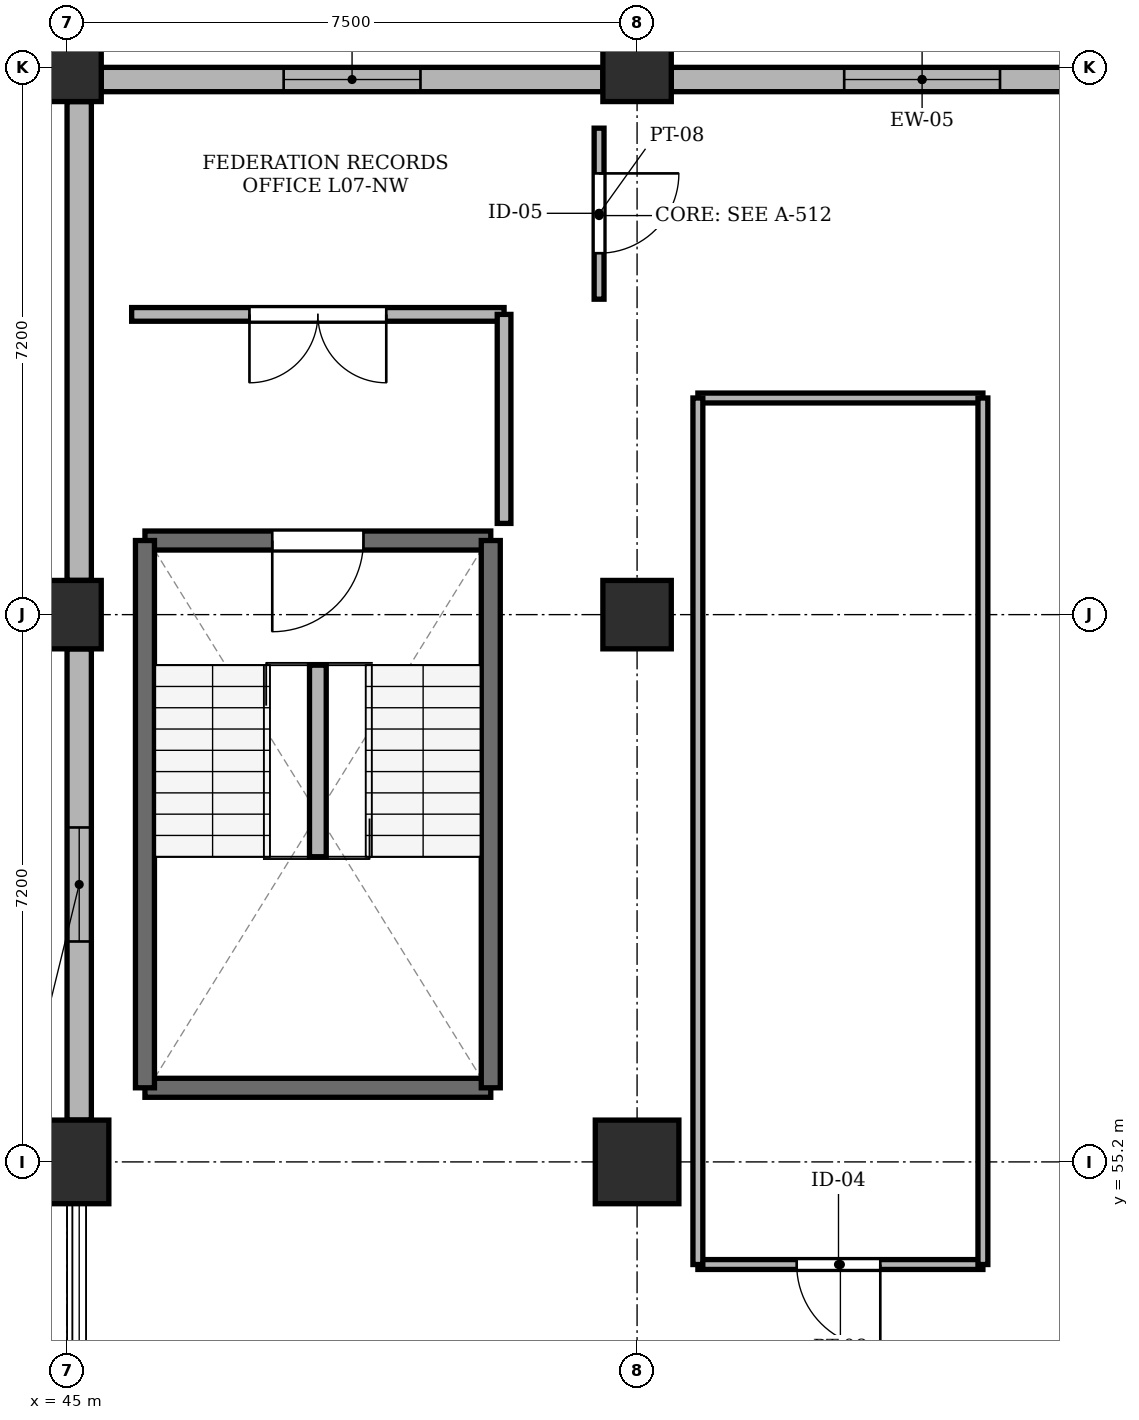
"""IFC4 building model, lengths in metres.
Left out: names, types, materials, properties, quantities, classifications, styles, units other than length and angle.
Written with IfcOpenShell. Run it as: python <this file> out.ifc"""

import sys

from ifc_helpers import new_model, si_unit, direction, frame, frame_2d, origin, origin_2d, place, context, subcontext, project, spatial, rectangle, extrude, element, fill, save


model = new_model("IFC4")
c1 = context("Model", 3, precision=1e-05, world=origin(), true_north=direction((0.0, 1.0)))
c2 = subcontext(c1, "Body", "Model", "MODEL_VIEW")
j1 = project(units=[si_unit("LENGTHUNIT", "METRE"), si_unit("PLANEANGLEUNIT", "RADIAN")], contexts=[c1])
p1 = place(None, origin())
s1 = spatial("IfcSite", under=j1, at=p1, CompositionType="ELEMENT")
p2 = place(p1, origin())
s2 = spatial("IfcBuilding", under=s1, at=p2, CompositionType="ELEMENT")
p3 = place(p2, frame((0.0, 0.0, 34.05)))
s3 = spatial("IfcBuildingStorey", under=s2, at=p3, CompositionType="ELEMENT", Elevation=34.05)
p4 = place(p3, frame((45.0, 55.2, -0.25), z_axis=(0.0, 0.0, 1.0), x_axis=(1.0, 0.0, 0.0)))
e1 = element("IfcColumn", 1, at=p4, inside=s3, PredefinedType="COLUMN", context=c2, shape_type="SweptSolid", body=[
    extrude(rectangle(XDim=1.1, YDim=1.1, at=origin_2d()), origin(), (0.0, 0.0, 1.0), 3.25),
])
for number, where, z_axis, x_axis in (
    (2, (45.0, 62.4, -0.25), (0.0, 0.0, 1.0), (1.0, 0.0, 0.0)),
    (3, (45.0, 69.6, -0.25), (0.0, 0.0, 1.0), (1.0, 0.0, 0.0)),
):
    element("IfcColumn", number, at=place(p3, frame(where, z_axis=z_axis, x_axis=x_axis)), inside=s3, PredefinedType="COLUMN", context=c2, shape_type="SweptSolid", body=[
        extrude(rectangle(XDim=0.9, YDim=0.9, at=origin_2d()), origin(), (0.0, 0.0, 1.0), 3.25),
    ])
p5 = place(p3, frame((52.5, 55.2, -0.25), z_axis=(0.0, 0.0, 1.0), x_axis=(1.0, 0.0, 0.0)))
e4 = element("IfcColumn", 4, at=p5, inside=s3, PredefinedType="COLUMN", context=c2, shape_type="SweptSolid", body=[
    extrude(rectangle(XDim=1.1, YDim=1.1, at=origin_2d()), origin(), (0.0, 0.0, 1.0), 3.25),
])
for number, where, z_axis, x_axis in (
    (5, (52.5, 62.4, -0.25), (0.0, 0.0, 1.0), (1.0, 0.0, 0.0)),
    (6, (52.5, 69.6, -0.25), (0.0, 0.0, 1.0), (1.0, 0.0, 0.0)),
):
    element("IfcColumn", number, at=place(p3, frame(where, z_axis=z_axis, x_axis=x_axis)), inside=s3, PredefinedType="COLUMN", context=c2, shape_type="SweptSolid", body=[
        extrude(rectangle(XDim=0.9, YDim=0.9, at=origin_2d()), origin(), (0.0, 0.0, 1.0), 3.25),
    ])
p6 = place(p3, frame((59.55, 69.44, 0.0), z_axis=(0.0, 0.0, 1.0), x_axis=(-1.0, 0.0, 0.0)))
e7 = element("IfcWall", 7, at=p6, inside=s3, PredefinedType="SOLIDWALL", context=c2, shape_type="SweptSolid", body=[
    extrude(rectangle(XDim=6.6, YDim=0.32, at=frame_2d((3.3, 0.0))), origin(), (0.0, 0.0, 1.0), 2.53),
])
p7 = place(p6, frame((2.275, 0.0, 0.62)))
e8 = element("IfcOpeningElement", 8, at=p7, cuts=e7, PredefinedType="OPENING", context=c2, shape_type="SweptSolid", body=[
    extrude(rectangle(XDim=2.05, YDim=1.81, at=frame_2d((1.025, 0.905))), frame((0.0, 0.172, 0.0), z_axis=(0.0, -1.0, 0.0), x_axis=(1.0, 0.0, 0.0)), (0.0, 0.0, 1.0), 0.344),
])
p8 = place(p3, frame((52.05, 69.44, 0.0), z_axis=(0.0, 0.0, 1.0), x_axis=(-1.0, 0.0, 0.0)))
e9 = element("IfcWall", 9, at=p8, inside=s3, PredefinedType="SOLIDWALL", context=c2, shape_type="SweptSolid", body=[
    extrude(rectangle(XDim=6.6, YDim=0.32, at=frame_2d((3.3, 0.0))), origin(), (0.0, 0.0, 1.0), 2.53),
])
p9 = place(p8, frame((2.4, 0.0, 0.62)))
e10 = element("IfcOpeningElement", 10, at=p9, cuts=e9, PredefinedType="OPENING", context=c2, shape_type="SweptSolid", body=[
    extrude(rectangle(XDim=1.8, YDim=1.81, at=frame_2d((0.9, 0.905))), frame((0.0, 0.172, 0.0), z_axis=(0.0, -1.0, 0.0), x_axis=(1.0, 0.0, 0.0)), (0.0, 0.0, 1.0), 0.344),
])
p10 = place(p3, frame((45.16, 69.15, 0.0), z_axis=(0.0, 0.0, 1.0), x_axis=(0.0, -1.0, 0.0)))
e11 = element("IfcWall", 11, at=p10, inside=s3, PredefinedType="SOLIDWALL", context=c2, shape_type="SweptSolid", body=[
    extrude(rectangle(XDim=6.3, YDim=0.32, at=frame_2d((3.15, 0.0))), origin(), (0.0, 0.0, 1.0), 2.53),
])
p11 = place(p3, frame((45.16, 61.95, 0.0), z_axis=(0.0, 0.0, 1.0), x_axis=(0.0, -1.0, 0.0)))
e12 = element("IfcWall", 12, at=p11, inside=s3, PredefinedType="SOLIDWALL", context=c2, shape_type="SweptSolid", body=[
    extrude(rectangle(XDim=6.2, YDim=0.32, at=frame_2d((3.1, 0.0))), origin(), (0.0, 0.0, 1.0), 2.53),
])
p12 = place(p11, frame((2.35, 0.0, 0.62)))
e13 = element("IfcOpeningElement", 13, at=p12, cuts=e12, PredefinedType="OPENING", context=c2, shape_type="SweptSolid", body=[
    extrude(rectangle(XDim=1.5, YDim=1.81, at=frame_2d((0.75, 0.905))), frame((0.0, 0.172, 0.0), z_axis=(0.0, -1.0, 0.0), x_axis=(1.0, 0.0, 0.0)), (0.0, 0.0, 1.0), 0.344),
])
p13 = place(p3, frame((46.025, 56.175, 0.0), z_axis=(0.0, 0.0, 1.0), x_axis=(1.0, 0.0, 0.0)))
e14 = element("IfcWall", 14, at=p13, inside=s3, PredefinedType="SHEAR", context=c2, shape_type="SweptSolid", body=[
    extrude(rectangle(XDim=4.55, YDim=0.25, at=frame_2d((2.275, 0.0))), origin(), (0.0, 0.0, 1.0), 3.0),
])
p14 = place(p3, frame((50.575, 63.375, 0.0), z_axis=(0.0, 0.0, 1.0), x_axis=(-1.0, 0.0, 0.0)))
e15 = element("IfcWall", 15, at=p14, inside=s3, PredefinedType="SHEAR", context=c2, shape_type="SweptSolid", body=[
    extrude(rectangle(XDim=4.55, YDim=0.25, at=frame_2d((2.275, 0.0))), origin(), (0.0, 0.0, 1.0), 3.0),
])
p15 = place(p14, frame((1.675, 0.0, 0.0)))
e16 = element("IfcOpeningElement", 16, at=p15, cuts=e15, PredefinedType="OPENING", context=c2, shape_type="SweptSolid", body=[
    extrude(rectangle(XDim=1.2, YDim=2.2, at=frame_2d((0.6, 1.1))), frame((0.0, 0.137, 0.0), z_axis=(0.0, -1.0, 0.0), x_axis=(1.0, 0.0, 0.0)), (0.0, 0.0, 1.0), 0.274),
])
for number, where, z_axis, x_axis in (
    (17, (46.025, 63.375, 0.0), (0.0, 0.0, 1.0), (0.0, -1.0, 0.0)),
    (18, (50.575, 56.175, 0.0), (0.0, 0.0, 1.0), (0.0, 1.0, 0.0)),
):
    element("IfcWall", number, at=place(p3, frame(where, z_axis=z_axis, x_axis=x_axis)), inside=s3, PredefinedType="SHEAR", context=c2, shape_type="SweptSolid", body=[
        extrude(rectangle(XDim=7.2, YDim=0.25, at=frame_2d((3.6, 0.0))), origin(), (0.0, 0.0, 1.0), 3.0),
    ])
p16 = place(p3, frame((48.3, 59.215, 0.0), z_axis=(0.0, 0.0, 1.0), x_axis=(0.0, 1.0, 0.0)))
e19 = element("IfcWall", 19, at=p16, inside=s3, PredefinedType="PARTITIONING", context=c2, shape_type="SweptSolid", body=[
    extrude(rectangle(XDim=2.52, YDim=0.22, at=frame_2d((1.26, 0.0))), origin(), (0.0, 0.0, 1.0), 3.0),
])
p17 = place(p3, frame((45.85, 66.35, 0.0), z_axis=(0.0, 0.0, 1.0), x_axis=(1.0, 0.0, 0.0)))
e20 = element("IfcWall", 20, at=p17, inside=s3, PredefinedType="PARTITIONING", context=c2, shape_type="SweptSolid", body=[
    extrude(rectangle(XDim=4.9, YDim=0.18, at=frame_2d((2.45, 0.0))), origin(), (0.0, 0.0, 1.0), 2.53),
])
p18 = place(p17, frame((1.55, 0.0, 0.0)))
e21 = element("IfcOpeningElement", 21, at=p18, cuts=e20, PredefinedType="OPENING", context=c2, shape_type="SweptSolid", body=[
    extrude(rectangle(XDim=1.8, YDim=2.2, at=frame_2d((0.9, 1.1))), frame((0.0, 0.102, 0.0), z_axis=(0.0, -1.0, 0.0), x_axis=(1.0, 0.0, 0.0)), (0.0, 0.0, 1.0), 0.204),
])
p19 = place(p3, frame((50.75, 63.6, 0.0), z_axis=(0.0, 0.0, 1.0), x_axis=(0.0, 1.0, 0.0)))
e22 = element("IfcWall", 22, at=p19, inside=s3, PredefinedType="PARTITIONING", context=c2, shape_type="SweptSolid", body=[
    extrude(rectangle(XDim=2.75, YDim=0.18, at=frame_2d((1.375, 0.0))), origin(), (0.0, 0.0, 1.0), 2.53),
])
p20 = place(p3, frame((53.3, 53.85, 0.0), z_axis=(0.0, 0.0, 1.0), x_axis=(1.0, 0.0, 0.0)))
e23 = element("IfcWall", 23, at=p20, inside=s3, PredefinedType="PARTITIONING", context=c2, shape_type="SweptSolid", body=[
    extrude(rectangle(XDim=3.75, YDim=0.13, at=frame_2d((1.875, 0.0))), origin(), (0.0, 0.0, 1.0), 2.53),
])
p21 = place(p20, frame((1.3, 0.0, 0.0)))
e24 = element("IfcOpeningElement", 24, at=p21, cuts=e23, PredefinedType="OPENING", context=c2, shape_type="SweptSolid", body=[
    extrude(rectangle(XDim=1.1, YDim=2.15, at=frame_2d((0.55, 1.075))), frame((0.0, 0.077, 0.0), z_axis=(0.0, -1.0, 0.0), x_axis=(1.0, 0.0, 0.0)), (0.0, 0.0, 1.0), 0.154),
])
p22 = place(p3, frame((53.3, 65.25, 0.0), z_axis=(0.0, 0.0, 1.0), x_axis=(1.0, 0.0, 0.0)))
e25 = element("IfcWall", 25, at=p22, inside=s3, PredefinedType="PARTITIONING", context=c2, shape_type="SweptSolid", body=[
    extrude(rectangle(XDim=3.75, YDim=0.13, at=frame_2d((1.875, 0.0))), origin(), (0.0, 0.0, 1.0), 2.53),
])
for number, where, z_axis, x_axis in (
    (26, (53.3, 53.85, 0.0), (0.0, 0.0, 1.0), (0.0, 1.0, 0.0)),
    (27, (57.05, 53.85, 0.0), (0.0, 0.0, 1.0), (0.0, 1.0, 0.0)),
):
    element("IfcWall", number, at=place(p3, frame(where, z_axis=z_axis, x_axis=x_axis)), inside=s3, PredefinedType="PARTITIONING", context=c2, shape_type="SweptSolid", body=[
        extrude(rectangle(XDim=11.4, YDim=0.13, at=frame_2d((5.7, 0.0))), origin(), (0.0, 0.0, 1.0), 2.53),
    ])
p23 = place(p3, frame((52.0, 66.55, 0.0), z_axis=(0.0, 0.0, 1.0), x_axis=(0.0, 1.0, 0.0)))
e28 = element("IfcWall", 28, at=p23, inside=s3, PredefinedType="PARTITIONING", context=c2, shape_type="SweptSolid", body=[
    extrude(rectangle(XDim=2.25, YDim=0.13, at=frame_2d((1.125, 0.0))), origin(), (0.0, 0.0, 1.0), 2.53),
])
p24 = place(p23, frame((0.605, 0.0, 0.0)))
e29 = element("IfcOpeningElement", 29, at=p24, cuts=e28, PredefinedType="OPENING", context=c2, shape_type="SweptSolid", body=[
    extrude(rectangle(XDim=1.05, YDim=2.15, at=frame_2d((0.525, 1.075))), frame((0.0, 0.077, 0.0), z_axis=(0.0, -1.0, 0.0), x_axis=(1.0, 0.0, 0.0)), (0.0, 0.0, 1.0), 0.154),
])
p25 = place(p7, origin())
e30 = element("IfcWindow", 30, at=p25, inside=s3, PartitioningType="SINGLE_PANEL", PredefinedType="WINDOW", context=c2, shape_type="SweptSolid", body=[
    extrude(rectangle(XDim=2.05, YDim=1.81, at=frame_2d((1.025, 0.905))), frame((0.0, 0.03, 0.0), z_axis=(0.0, -1.0, 0.0), x_axis=(1.0, 0.0, 0.0)), (0.0, 0.0, 1.0), 0.06),
])
fill(e8, e30)
p26 = place(p9, origin())
e31 = element("IfcWindow", 31, at=p26, inside=s3, PartitioningType="SINGLE_PANEL", PredefinedType="WINDOW", context=c2, shape_type="SweptSolid", body=[
    extrude(rectangle(XDim=1.8, YDim=1.81, at=frame_2d((0.9, 0.905))), frame((0.0, 0.03, 0.0), z_axis=(0.0, -1.0, 0.0), x_axis=(1.0, 0.0, 0.0)), (0.0, 0.0, 1.0), 0.06),
])
fill(e10, e31)
p27 = place(p12, origin())
e32 = element("IfcWindow", 32, at=p27, inside=s3, PartitioningType="SINGLE_PANEL", PredefinedType="WINDOW", context=c2, shape_type="SweptSolid", body=[
    extrude(rectangle(XDim=1.5, YDim=1.81, at=frame_2d((0.75, 0.905))), frame((0.0, 0.03, 0.0), z_axis=(0.0, -1.0, 0.0), x_axis=(1.0, 0.0, 0.0)), (0.0, 0.0, 1.0), 0.06),
])
fill(e13, e32)
p28 = place(p15, origin())
e33 = element("IfcDoor", 33, at=p28, inside=s3, OperationType="SINGLE_SWING_RIGHT", PredefinedType="DOOR", context=c2, shape_type="SweptSolid", body=[
    extrude(rectangle(XDim=1.2, YDim=2.2, at=frame_2d((0.6, 1.1))), frame((0.0, 0.025, 0.0), z_axis=(0.0, -1.0, 0.0), x_axis=(1.0, 0.0, 0.0)), (0.0, 0.0, 1.0), 0.05),
])
fill(e16, e33)
p29 = place(p18, frame((1.8, 0.0, 0.0), z_axis=(0.0, 0.0, 1.0), x_axis=(-1.0, 0.0, 0.0)))
e34 = element("IfcDoor", 34, at=p29, inside=s3, OperationType="DOUBLE_DOOR_SINGLE_SWING", PredefinedType="DOOR", context=c2, shape_type="SweptSolid", body=[
    extrude(rectangle(XDim=1.8, YDim=2.2, at=frame_2d((0.9, 1.1))), frame((0.0, 0.025, 0.0), z_axis=(0.0, -1.0, 0.0), x_axis=(1.0, 0.0, 0.0)), (0.0, 0.0, 1.0), 0.05),
])
fill(e21, e34)
p30 = place(p21, frame((1.1, 0.0, 0.0), z_axis=(0.0, 0.0, 1.0), x_axis=(-1.0, 0.0, 0.0)))
e35 = element("IfcDoor", 35, at=p30, inside=s3, OperationType="SINGLE_SWING_RIGHT", PredefinedType="DOOR", context=c2, shape_type="SweptSolid", body=[
    extrude(rectangle(XDim=1.1, YDim=2.15, at=frame_2d((0.55, 1.075))), frame((0.0, 0.025, 0.0), z_axis=(0.0, -1.0, 0.0), x_axis=(1.0, 0.0, 0.0)), (0.0, 0.0, 1.0), 0.05),
])
fill(e24, e35)
p31 = place(p24, frame((1.05, 0.0, 0.0), z_axis=(0.0, 0.0, 1.0), x_axis=(-1.0, 0.0, 0.0)))
e36 = element("IfcDoor", 36, at=p31, inside=s3, OperationType="SINGLE_SWING_RIGHT", PredefinedType="DOOR", context=c2, shape_type="SweptSolid", body=[
    extrude(rectangle(XDim=1.05, YDim=2.15, at=frame_2d((0.525, 1.075))), frame((0.0, 0.025, 0.0), z_axis=(0.0, -1.0, 0.0), x_axis=(1.0, 0.0, 0.0)), (0.0, 0.0, 1.0), 0.05),
])
fill(e29, e36)
save(model, sys.argv[1])
